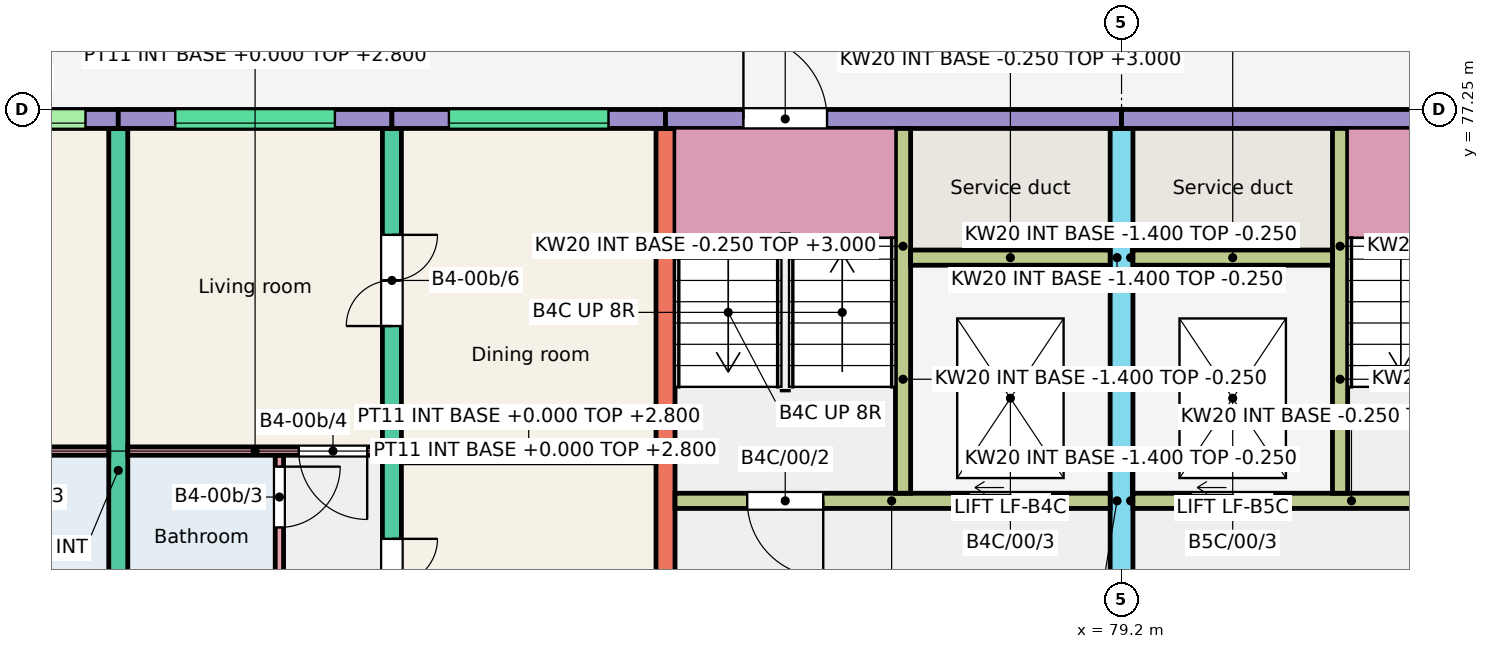
"""IFC4 building model, lengths in metres.
Left out: names, types, materials, properties, quantities, classifications, styles, units other than length and angle.
Written with IfcOpenShell. Run it as: python <this file> out.ifc"""

import sys

from ifc_helpers import new_model, si_unit, direction, frame, frame_2d, origin, place, context, subcontext, project, spatial, rectangle, extrude, element, fill, save


model = new_model("IFC4")
c1 = context("Model", 3, precision=1e-05, world=origin(), true_north=direction((0.0, 1.0)))
c2 = subcontext(c1, "Body", "Model", "MODEL_VIEW")
j1 = project(units=[si_unit("LENGTHUNIT", "METRE"), si_unit("PLANEANGLEUNIT", "RADIAN")], contexts=[c1])
p1 = place(None, origin())
s1 = spatial("IfcSite", under=j1, at=p1, CompositionType="ELEMENT")
p2 = place(p1, origin())
s2 = spatial("IfcBuilding", under=s1, at=p2, CompositionType="ELEMENT")
p3 = place(p2, origin())
s3 = spatial("IfcBuildingStorey", under=s2, at=p3, CompositionType="ELEMENT", Elevation=0.0)
p4 = place(p3, frame((66.0, 68.0, -0.25), z_axis=(0.0, 0.0, 1.0), x_axis=(0.0, 1.0, 0.0)))
e1 = element("IfcWall", 1, at=p4, inside=s3, PredefinedType="SHEAR", context=c2, shape_type="SweptSolid", body=[
    extrude(rectangle(XDim=9.0, YDim=0.25, at=frame_2d((4.5, 0.0))), origin(), (0.0, 0.0, 1.0), 3.25),
])
p5 = place(p3, frame((69.6, 68.0, -0.25), z_axis=(0.0, 0.0, 1.0), x_axis=(0.0, 1.0, 0.0)))
e2 = element("IfcWall", 2, at=p5, inside=s3, PredefinedType="SHEAR", context=c2, shape_type="SweptSolid", body=[
    extrude(rectangle(XDim=9.0, YDim=0.25, at=frame_2d((4.5, 0.0))), origin(), (0.0, 0.0, 1.0), 3.25),
])
p6 = place(p5, frame((2.4, 0.0, 0.25)))
e3 = element("IfcOpeningElement", 3, at=p6, cuts=e2, PredefinedType="OPENING", context=c2, shape_type="SweptSolid", body=[
    extrude(rectangle(XDim=1.2, YDim=2.1, at=frame_2d((0.6, 1.05))), frame((0.0, 0.135, 0.0), z_axis=(0.0, -1.0, 0.0), x_axis=(1.0, 0.0, 0.0)), (0.0, 0.0, 1.0), 0.27),
])
p7 = place(p5, frame((6.4, 0.0, 0.25)))
e4 = element("IfcOpeningElement", 4, at=p7, cuts=e2, PredefinedType="OPENING", context=c2, shape_type="SweptSolid", body=[
    extrude(rectangle(XDim=1.2, YDim=2.1, at=frame_2d((0.6, 1.05))), frame((0.0, 0.135, 0.0), z_axis=(0.0, -1.0, 0.0), x_axis=(1.0, 0.0, 0.0)), (0.0, 0.0, 1.0), 0.27),
])
p8 = place(p3, frame((73.2, 68.0, -0.25), z_axis=(0.0, 0.0, 1.0), x_axis=(0.0, 1.0, 0.0)))
e5 = element("IfcWall", 5, at=p8, inside=s3, PredefinedType="SHEAR", context=c2, shape_type="SweptSolid", body=[
    extrude(rectangle(XDim=9.0, YDim=0.25, at=frame_2d((4.5, 0.0))), origin(), (0.0, 0.0, 1.0), 3.25),
])
p9 = place(p3, frame((79.2, 66.0, -0.25), z_axis=(0.0, 0.0, 1.0), x_axis=(0.0, 1.0, 0.0)))
e6 = element("IfcWall", 6, at=p9, inside=s3, PredefinedType="SHEAR", context=c2, shape_type="SweptSolid", body=[
    extrude(rectangle(XDim=11.0, YDim=0.3, at=frame_2d((5.5, 0.0))), origin(), (0.0, 0.0, 1.0), 3.25),
])
p10 = place(p9, frame((0.3, 0.0, 0.25)))
e7 = element("IfcOpeningElement", 7, at=p10, cuts=e6, PredefinedType="OPENING", context=c2, shape_type="SweptSolid", body=[
    extrude(rectangle(XDim=1.2, YDim=2.1, at=frame_2d((0.6, 1.05))), frame((0.0, 0.16, 0.0), z_axis=(0.0, -1.0, 0.0), x_axis=(1.0, 0.0, 0.0)), (0.0, 0.0, 1.0), 0.32),
])
p11 = place(p3, frame((62.4, 77.125, -0.25), z_axis=(0.0, 0.0, 1.0), x_axis=(1.0, 0.0, 0.0)))
e8 = element("IfcWall", 8, at=p11, inside=s3, PredefinedType="SOLIDWALL", context=c2, shape_type="SweptSolid", body=[
    extrude(rectangle(XDim=3.6, YDim=0.25, at=frame_2d((1.8, 0.0))), origin(), (0.0, 0.0, 1.0), 3.25),
])
p12 = place(p11, frame((1.669, 0.0, 1.45)))
e9 = element("IfcOpeningElement", 9, at=p12, cuts=e8, PredefinedType="OPENING", context=c2, shape_type="SweptSolid", body=[
    extrude(rectangle(XDim=1.5, YDim=1.2, at=frame_2d((0.75, 0.6))), frame((0.0, 0.135, 0.0), z_axis=(0.0, -1.0, 0.0), x_axis=(1.0, 0.0, 0.0)), (0.0, 0.0, 1.0), 0.27),
])
p13 = place(p11, frame((0.263, 0.0, 0.25)))
e10 = element("IfcOpeningElement", 10, at=p13, cuts=e8, PredefinedType="OPENING", context=c2, shape_type="SweptSolid", body=[
    extrude(rectangle(XDim=1.0, YDim=2.1, at=frame_2d((0.5, 1.05))), frame((0.0, 0.135, 0.0), z_axis=(0.0, -1.0, 0.0), x_axis=(1.0, 0.0, 0.0)), (0.0, 0.0, 1.0), 0.27),
])
p14 = place(p3, frame((66.0, 77.125, -0.25), z_axis=(0.0, 0.0, 1.0), x_axis=(1.0, 0.0, 0.0)))
e11 = element("IfcWall", 11, at=p14, inside=s3, PredefinedType="SOLIDWALL", context=c2, shape_type="SweptSolid", body=[
    extrude(rectangle(XDim=3.6, YDim=0.25, at=frame_2d((1.8, 0.0))), origin(), (0.0, 0.0, 1.0), 3.25),
])
p15 = place(p14, frame((0.75, 0.0, 1.45)))
e12 = element("IfcOpeningElement", 12, at=p15, cuts=e11, PredefinedType="OPENING", context=c2, shape_type="SweptSolid", body=[
    extrude(rectangle(XDim=2.1, YDim=1.2, at=frame_2d((1.05, 0.6))), frame((0.0, 0.135, 0.0), z_axis=(0.0, -1.0, 0.0), x_axis=(1.0, 0.0, 0.0)), (0.0, 0.0, 1.0), 0.27),
])
p16 = place(p3, frame((69.6, 77.125, -0.25), z_axis=(0.0, 0.0, 1.0), x_axis=(1.0, 0.0, 0.0)))
e13 = element("IfcWall", 13, at=p16, inside=s3, PredefinedType="SOLIDWALL", context=c2, shape_type="SweptSolid", body=[
    extrude(rectangle(XDim=3.6, YDim=0.25, at=frame_2d((1.8, 0.0))), origin(), (0.0, 0.0, 1.0), 3.25),
])
p17 = place(p16, frame((0.75, 0.0, 1.45)))
e14 = element("IfcOpeningElement", 14, at=p17, cuts=e13, PredefinedType="OPENING", context=c2, shape_type="SweptSolid", body=[
    extrude(rectangle(XDim=2.1, YDim=1.2, at=frame_2d((1.05, 0.6))), frame((0.0, 0.135, 0.0), z_axis=(0.0, -1.0, 0.0), x_axis=(1.0, 0.0, 0.0)), (0.0, 0.0, 1.0), 0.27),
])
p18 = place(p3, frame((73.2, 77.125, -0.25), z_axis=(0.0, 0.0, 1.0), x_axis=(1.0, 0.0, 0.0)))
e15 = element("IfcWall", 15, at=p18, inside=s3, PredefinedType="SOLIDWALL", context=c2, shape_type="SweptSolid", body=[
    extrude(rectangle(XDim=6.0, YDim=0.25, at=frame_2d((3.0, 0.0))), origin(), (0.0, 0.0, 1.0), 3.25),
])
p19 = place(p18, frame((1.025, 0.0, 0.25)))
e16 = element("IfcOpeningElement", 16, at=p19, cuts=e15, PredefinedType="OPENING", context=c2, shape_type="SweptSolid", body=[
    extrude(rectangle(XDim=1.1, YDim=2.1, at=frame_2d((0.55, 1.05))), frame((0.0, 0.135, 0.0), z_axis=(0.0, -1.0, 0.0), x_axis=(1.0, 0.0, 0.0)), (0.0, 0.0, 1.0), 0.27),
])
p20 = place(p3, frame((73.325, 72.1, -0.25), z_axis=(0.0, 0.0, 1.0), x_axis=(1.0, 0.0, 0.0)))
e17 = element("IfcWall", 17, at=p20, inside=s3, PredefinedType="SHEAR", context=c2, shape_type="SweptSolid", body=[
    extrude(rectangle(XDim=5.725, YDim=0.2, at=frame_2d((2.863, 0.0))), origin(), (0.0, 0.0, 1.0), 3.25),
])
p21 = place(p20, frame((0.95, 0.0, 0.25)))
e18 = element("IfcOpeningElement", 18, at=p21, cuts=e17, PredefinedType="OPENING", context=c2, shape_type="SweptSolid", body=[
    extrude(rectangle(XDim=1.0, YDim=2.1, at=frame_2d((0.5, 1.05))), frame((0.0, 0.11, 0.0), z_axis=(0.0, -1.0, 0.0), x_axis=(1.0, 0.0, 0.0)), (0.0, 0.0, 1.0), 0.22),
])
p22 = place(p20, frame((3.863, 0.0, 0.25)))
e19 = element("IfcOpeningElement", 19, at=p22, cuts=e17, PredefinedType="OPENING", context=c2, shape_type="SweptSolid", body=[
    extrude(rectangle(XDim=1.1, YDim=2.1, at=frame_2d((0.55, 1.05))), frame((0.0, 0.11, 0.0), z_axis=(0.0, -1.0, 0.0), x_axis=(1.0, 0.0, 0.0)), (0.0, 0.0, 1.0), 0.22),
])
p23 = place(p3, frame((76.325, 72.2, -0.25), z_axis=(0.0, 0.0, 1.0), x_axis=(0.0, 1.0, 0.0)))
e20 = element("IfcWall", 20, at=p23, inside=s3, PredefinedType="SHEAR", context=c2, shape_type="SweptSolid", body=[
    extrude(rectangle(XDim=4.8, YDim=0.2, at=frame_2d((2.4, 0.0))), origin(), (0.0, 0.0, 1.0), 3.25),
])
p24 = place(p3, frame((76.425, 75.3, -0.25), z_axis=(0.0, 0.0, 1.0), x_axis=(1.0, 0.0, 0.0)))
e21 = element("IfcWall", 21, at=p24, inside=s3, PredefinedType="SHEAR", context=c2, shape_type="SweptSolid", body=[
    extrude(rectangle(XDim=2.625, YDim=0.2, at=frame_2d((1.312, 0.0))), origin(), (0.0, 0.0, 1.0), 3.25),
])
p25 = place(p3, frame((79.2, 77.125, -0.25), z_axis=(0.0, 0.0, 1.0), x_axis=(1.0, 0.0, 0.0)))
e22 = element("IfcWall", 22, at=p25, inside=s3, PredefinedType="SOLIDWALL", context=c2, shape_type="SweptSolid", body=[
    extrude(rectangle(XDim=6.0, YDim=0.25, at=frame_2d((3.0, 0.0))), origin(), (0.0, 0.0, 1.0), 3.25),
])
p26 = place(p25, frame((3.875, 0.0, 0.25)))
e23 = element("IfcOpeningElement", 23, at=p26, cuts=e22, PredefinedType="OPENING", context=c2, shape_type="SweptSolid", body=[
    extrude(rectangle(XDim=1.1, YDim=2.1, at=frame_2d((0.55, 1.05))), frame((0.0, 0.135, 0.0), z_axis=(0.0, -1.0, 0.0), x_axis=(1.0, 0.0, 0.0)), (0.0, 0.0, 1.0), 0.27),
])
p27 = place(p3, frame((79.35, 72.1, -0.25), z_axis=(0.0, 0.0, 1.0), x_axis=(1.0, 0.0, 0.0)))
e24 = element("IfcWall", 24, at=p27, inside=s3, PredefinedType="SHEAR", context=c2, shape_type="SweptSolid", body=[
    extrude(rectangle(XDim=5.725, YDim=0.2, at=frame_2d((2.862, 0.0))), origin(), (0.0, 0.0, 1.0), 3.25),
])
p28 = place(p27, frame((3.775, 0.0, 0.25)))
e25 = element("IfcOpeningElement", 25, at=p28, cuts=e24, PredefinedType="OPENING", context=c2, shape_type="SweptSolid", body=[
    extrude(rectangle(XDim=1.0, YDim=2.1, at=frame_2d((0.5, 1.05))), frame((0.0, 0.11, 0.0), z_axis=(0.0, -1.0, 0.0), x_axis=(1.0, 0.0, 0.0)), (0.0, 0.0, 1.0), 0.22),
])
p29 = place(p27, frame((0.762, 0.0, 0.25)))
e26 = element("IfcOpeningElement", 26, at=p29, cuts=e24, PredefinedType="OPENING", context=c2, shape_type="SweptSolid", body=[
    extrude(rectangle(XDim=1.1, YDim=2.1, at=frame_2d((0.55, 1.05))), frame((0.0, 0.11, 0.0), z_axis=(0.0, -1.0, 0.0), x_axis=(1.0, 0.0, 0.0)), (0.0, 0.0, 1.0), 0.22),
])
p30 = place(p3, frame((82.075, 72.2, -0.25), z_axis=(0.0, 0.0, 1.0), x_axis=(0.0, 1.0, 0.0)))
e27 = element("IfcWall", 27, at=p30, inside=s3, PredefinedType="SHEAR", context=c2, shape_type="SweptSolid", body=[
    extrude(rectangle(XDim=4.8, YDim=0.2, at=frame_2d((2.4, 0.0))), origin(), (0.0, 0.0, 1.0), 3.25),
])
p31 = place(p3, frame((79.35, 75.3, -0.25), z_axis=(0.0, 0.0, 1.0), x_axis=(1.0, 0.0, 0.0)))
e28 = element("IfcWall", 28, at=p31, inside=s3, PredefinedType="SHEAR", context=c2, shape_type="SweptSolid", body=[
    extrude(rectangle(XDim=2.625, YDim=0.2, at=frame_2d((1.312, 0.0))), origin(), (0.0, 0.0, 1.0), 3.25),
])
for number, where, z_axis, x_axis in (
    (29, (76.225, 72.1, -1.4), (0.0, 0.0, 1.0), (1.0, 0.0, 0.0)),
    (30, (76.225, 75.3, -1.4), (0.0, 0.0, 1.0), (1.0, 0.0, 0.0)),
):
    element("IfcWall", number, at=place(p3, frame(where, z_axis=z_axis, x_axis=x_axis)), inside=s3, PredefinedType="SHEAR", context=c2, shape_type="SweptSolid", body=[
        extrude(rectangle(XDim=2.975, YDim=0.2, at=frame_2d((1.487, 0.0))), origin(), (0.0, 0.0, 1.0), 1.15),
    ])
p32 = place(p3, frame((76.325, 72.2, -1.4), z_axis=(0.0, 0.0, 1.0), x_axis=(0.0, 1.0, 0.0)))
e31 = element("IfcWall", 31, at=p32, inside=s3, PredefinedType="SHEAR", context=c2, shape_type="SweptSolid", body=[
    extrude(rectangle(XDim=3.0, YDim=0.2, at=frame_2d((1.5, 0.0))), origin(), (0.0, 0.0, 1.0), 1.15),
])
p33 = place(p3, frame((79.125, 72.2, -1.4), z_axis=(0.0, 0.0, 1.0), x_axis=(0.0, 1.0, 0.0)))
e32 = element("IfcWall", 32, at=p33, inside=s3, PredefinedType="SHEAR", context=c2, shape_type="SweptSolid", body=[
    extrude(rectangle(XDim=3.0, YDim=0.15, at=frame_2d((1.5, 0.0))), origin(), (0.0, 0.0, 1.0), 1.15),
])
for number, where, z_axis, x_axis in (
    (33, (79.2, 72.1, -1.4), (0.0, 0.0, 1.0), (1.0, 0.0, 0.0)),
    (34, (79.2, 75.3, -1.4), (0.0, 0.0, 1.0), (1.0, 0.0, 0.0)),
):
    element("IfcWall", number, at=place(p3, frame(where, z_axis=z_axis, x_axis=x_axis)), inside=s3, PredefinedType="SHEAR", context=c2, shape_type="SweptSolid", body=[
        extrude(rectangle(XDim=2.975, YDim=0.2, at=frame_2d((1.488, 0.0))), origin(), (0.0, 0.0, 1.0), 1.15),
    ])
p34 = place(p3, frame((82.075, 72.2, -1.4), z_axis=(0.0, 0.0, 1.0), x_axis=(0.0, 1.0, 0.0)))
e35 = element("IfcWall", 35, at=p34, inside=s3, PredefinedType="SHEAR", context=c2, shape_type="SweptSolid", body=[
    extrude(rectangle(XDim=3.0, YDim=0.2, at=frame_2d((1.5, 0.0))), origin(), (0.0, 0.0, 1.0), 1.15),
])
p35 = place(p3, frame((79.275, 72.2, -1.4), z_axis=(0.0, 0.0, 1.0), x_axis=(0.0, 1.0, 0.0)))
e36 = element("IfcWall", 36, at=p35, inside=s3, PredefinedType="SHEAR", context=c2, shape_type="SweptSolid", body=[
    extrude(rectangle(XDim=3.0, YDim=0.15, at=frame_2d((1.5, 0.0))), origin(), (0.0, 0.0, 1.0), 1.15),
])
p36 = place(p3, frame((62.55, 72.755, 0.0), z_axis=(0.0, 0.0, 1.0), x_axis=(1.0, 0.0, 0.0)))
e37 = element("IfcWall", 37, at=p36, inside=s3, PredefinedType="PARTITIONING", context=c2, shape_type="SweptSolid", body=[
    extrude(rectangle(XDim=3.325, YDim=0.11, at=frame_2d((1.663, 0.0))), origin(), (0.0, 0.0, 1.0), 2.8),
])
p37 = place(p36, frame((0.2, 0.0, 0.0)))
e38 = element("IfcOpeningElement", 38, at=p37, cuts=e37, PredefinedType="OPENING", context=c2, shape_type="SweptSolid", body=[
    extrude(rectangle(XDim=0.9, YDim=2.1, at=frame_2d((0.45, 1.05))), frame((0.0, 0.065, 0.0), z_axis=(0.0, -1.0, 0.0), x_axis=(1.0, 0.0, 0.0)), (0.0, 0.0, 1.0), 0.13),
])
p38 = place(p3, frame((68.12, 68.0, 0.0), z_axis=(0.0, 0.0, 1.0), x_axis=(0.0, 1.0, 0.0)))
e39 = element("IfcWall", 39, at=p38, inside=s3, PredefinedType="PARTITIONING", context=c2, shape_type="SweptSolid", body=[
    extrude(rectangle(XDim=4.7, YDim=0.11, at=frame_2d((2.35, 0.0))), origin(), (0.0, 0.0, 1.0), 2.8),
])
p39 = place(p38, frame((0.2, 0.0, 0.0)))
e40 = element("IfcOpeningElement", 40, at=p39, cuts=e39, PredefinedType="OPENING", context=c2, shape_type="SweptSolid", body=[
    extrude(rectangle(XDim=0.8, YDim=2.1, at=frame_2d((0.4, 1.05))), frame((0.0, 0.065, 0.0), z_axis=(0.0, -1.0, 0.0), x_axis=(1.0, 0.0, 0.0)), (0.0, 0.0, 1.0), 0.13),
])
p40 = place(p38, frame((3.75, 0.0, 0.0)))
e41 = element("IfcOpeningElement", 41, at=p40, cuts=e39, PredefinedType="OPENING", context=c2, shape_type="SweptSolid", body=[
    extrude(rectangle(XDim=0.8, YDim=2.1, at=frame_2d((0.4, 1.05))), frame((0.0, 0.065, 0.0), z_axis=(0.0, -1.0, 0.0), x_axis=(1.0, 0.0, 0.0)), (0.0, 0.0, 1.0), 0.13),
])
p41 = place(p3, frame((66.125, 72.755, 0.0), z_axis=(0.0, 0.0, 1.0), x_axis=(1.0, 0.0, 0.0)))
e42 = element("IfcWall", 42, at=p41, inside=s3, PredefinedType="PARTITIONING", context=c2, shape_type="SweptSolid", body=[
    extrude(rectangle(XDim=3.35, YDim=0.11, at=frame_2d((1.675, 0.0))), origin(), (0.0, 0.0, 1.0), 2.8),
])
p42 = place(p41, frame((2.25, 0.0, 0.0)))
e43 = element("IfcOpeningElement", 43, at=p42, cuts=e42, PredefinedType="OPENING", context=c2, shape_type="SweptSolid", body=[
    extrude(rectangle(XDim=0.9, YDim=2.1, at=frame_2d((0.45, 1.05))), frame((0.0, 0.065, 0.0), z_axis=(0.0, -1.0, 0.0), x_axis=(1.0, 0.0, 0.0)), (0.0, 0.0, 1.0), 0.13),
])
p43 = place(p3, frame((69.725, 72.655, 0.0), z_axis=(0.0, 0.0, 1.0), x_axis=(1.0, 0.0, 0.0)))
e44 = element("IfcWall", 44, at=p43, inside=s3, PredefinedType="PARTITIONING", context=c2, shape_type="SweptSolid", body=[
    extrude(rectangle(XDim=3.35, YDim=0.11, at=frame_2d((1.675, 0.0))), origin(), (0.0, 0.0, 1.0), 2.8),
])
p44 = place(p12, origin())
e45 = element("IfcWindow", 45, at=p44, inside=s3, PartitioningType="SINGLE_PANEL", PredefinedType="WINDOW", context=c2, shape_type="SweptSolid", body=[
    extrude(rectangle(XDim=1.5, YDim=1.2, at=frame_2d((0.75, 0.6))), frame((0.0, -0.025, 0.0), z_axis=(0.0, -1.0, 0.0), x_axis=(1.0, 0.0, 0.0)), (0.0, 0.0, 1.0), 0.06),
])
fill(e9, e45)
p45 = place(p17, origin())
e46 = element("IfcWindow", 46, at=p45, inside=s3, PartitioningType="SINGLE_PANEL", PredefinedType="WINDOW", context=c2, shape_type="SweptSolid", body=[
    extrude(rectangle(XDim=2.1, YDim=1.2, at=frame_2d((1.05, 0.6))), frame((0.0, -0.025, 0.0), z_axis=(0.0, -1.0, 0.0), x_axis=(1.0, 0.0, 0.0)), (0.0, 0.0, 1.0), 0.06),
])
fill(e14, e46)
p46 = place(p15, origin())
e47 = element("IfcWindow", 47, at=p46, inside=s3, PartitioningType="SINGLE_PANEL", PredefinedType="WINDOW", context=c2, shape_type="SweptSolid", body=[
    extrude(rectangle(XDim=2.1, YDim=1.2, at=frame_2d((1.05, 0.6))), frame((0.0, -0.025, 0.0), z_axis=(0.0, -1.0, 0.0), x_axis=(1.0, 0.0, 0.0)), (0.0, 0.0, 1.0), 0.06),
])
fill(e12, e47)
p47 = place(p40, origin())
e48 = element("IfcDoor", 48, at=p47, inside=s3, OperationType="SINGLE_SWING_RIGHT", PredefinedType="DOOR", context=c2, shape_type="SweptSolid", body=[
    extrude(rectangle(XDim=0.8, YDim=2.1, at=frame_2d((0.4, 1.05))), frame((0.0, 0.025, 0.0), z_axis=(0.0, -1.0, 0.0), x_axis=(1.0, 0.0, 0.0)), (0.0, 0.0, 1.0), 0.05),
])
fill(e41, e48)
p48 = place(p42, origin())
e49 = element("IfcDoor", 49, at=p48, inside=s3, OperationType="SINGLE_SWING_RIGHT", PredefinedType="DOOR", context=c2, shape_type="SweptSolid", body=[
    extrude(rectangle(XDim=0.9, YDim=2.1, at=frame_2d((0.45, 1.05))), frame((0.0, 0.025, 0.0), z_axis=(0.0, -1.0, 0.0), x_axis=(1.0, 0.0, 0.0)), (0.0, 0.0, 1.0), 0.05),
])
fill(e43, e49)
p49 = place(p6, origin())
e50 = element("IfcDoor", 50, at=p49, inside=s3, OperationType="DOUBLE_DOOR_SINGLE_SWING", PredefinedType="DOOR", context=c2, shape_type="SweptSolid", body=[
    extrude(rectangle(XDim=1.2, YDim=2.1, at=frame_2d((0.6, 1.05))), frame((0.0, 0.025, 0.0), z_axis=(0.0, -1.0, 0.0), x_axis=(1.0, 0.0, 0.0)), (0.0, 0.0, 1.0), 0.05),
])
fill(e3, e50)
p50 = place(p7, origin())
e51 = element("IfcDoor", 51, at=p50, inside=s3, OperationType="DOUBLE_DOOR_SINGLE_SWING", PredefinedType="DOOR", context=c2, shape_type="SweptSolid", body=[
    extrude(rectangle(XDim=1.2, YDim=2.1, at=frame_2d((0.6, 1.05))), frame((0.0, 0.025, 0.0), z_axis=(0.0, -1.0, 0.0), x_axis=(1.0, 0.0, 0.0)), (0.0, 0.0, 1.0), 0.05),
])
fill(e4, e51)
p51 = place(p21, origin())
e52 = element("IfcDoor", 52, at=p51, inside=s3, OperationType="SINGLE_SWING_RIGHT", PredefinedType="DOOR", context=c2, shape_type="SweptSolid", body=[
    extrude(rectangle(XDim=1.0, YDim=2.1, at=frame_2d((0.5, 1.05))), frame((0.0, 0.025, 0.0), z_axis=(0.0, -1.0, 0.0), x_axis=(1.0, 0.0, 0.0)), (0.0, 0.0, 1.0), 0.05),
])
fill(e18, e52)
p52 = place(p22, origin())
e53 = element("IfcDoor", 53, at=p52, inside=s3, OperationType="DOUBLE_DOOR_SLIDING", PredefinedType="DOOR", context=c2, shape_type="SweptSolid", body=[
    extrude(rectangle(XDim=1.1, YDim=2.1, at=frame_2d((0.55, 1.05))), frame((0.0, 0.025, 0.0), z_axis=(0.0, -1.0, 0.0), x_axis=(1.0, 0.0, 0.0)), (0.0, 0.0, 1.0), 0.05),
])
fill(e19, e53)
p53 = place(p19, origin())
e54 = element("IfcDoor", 54, at=p53, inside=s3, OperationType="SINGLE_SWING_LEFT", PredefinedType="DOOR", context=c2, shape_type="SweptSolid", body=[
    extrude(rectangle(XDim=1.1, YDim=2.1, at=frame_2d((0.55, 1.05))), frame((0.0, 0.025, 0.0), z_axis=(0.0, -1.0, 0.0), x_axis=(1.0, 0.0, 0.0)), (0.0, 0.0, 1.0), 0.05),
])
fill(e16, e54)
p54 = place(p29, origin())
e55 = element("IfcDoor", 55, at=p54, inside=s3, OperationType="DOUBLE_DOOR_SLIDING", PredefinedType="DOOR", context=c2, shape_type="SweptSolid", body=[
    extrude(rectangle(XDim=1.1, YDim=2.1, at=frame_2d((0.55, 1.05))), frame((0.0, 0.025, 0.0), z_axis=(0.0, -1.0, 0.0), x_axis=(1.0, 0.0, 0.0)), (0.0, 0.0, 1.0), 0.05),
])
fill(e26, e55)
save(model, sys.argv[1])
